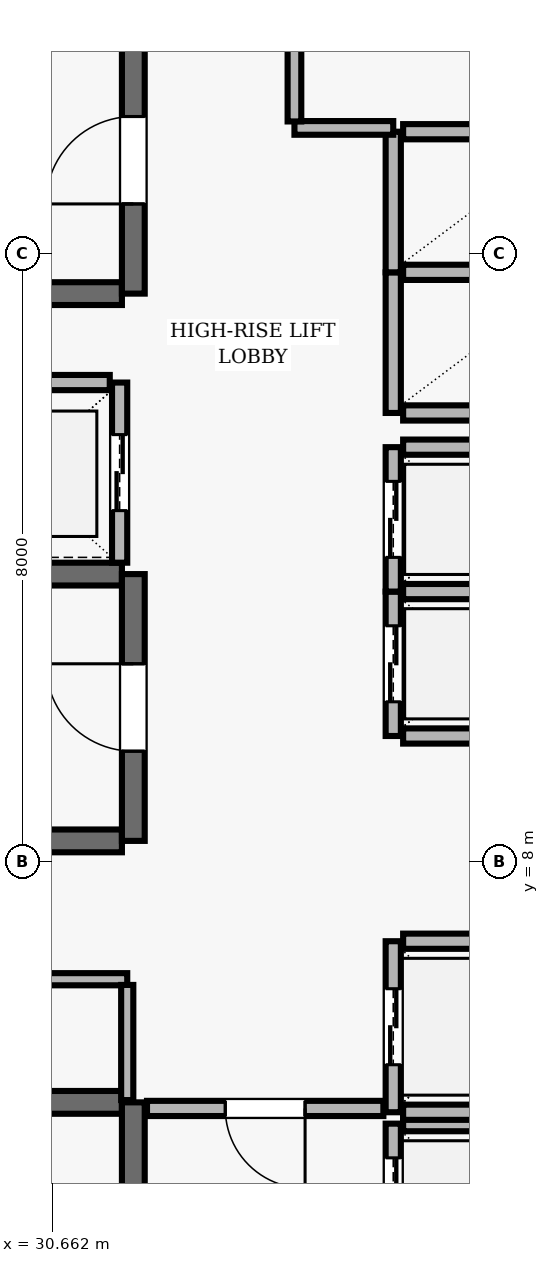
"""IFC4 building model, lengths in metres.
Left out: names, types, materials, properties, quantities, classifications, styles, units other than length and angle.
Written with IfcOpenShell. Run it as: python <this file> out.ifc"""

import sys

from ifc_helpers import new_model, si_unit, direction, frame, frame_2d, origin, place, context, subcontext, project, spatial, rectangle, extrude, element, fill, save


model = new_model("IFC4")
c1 = context("Model", 3, precision=1e-05, world=origin(), true_north=direction((0.0, 1.0)))
c2 = subcontext(c1, "Body", "Model", "MODEL_VIEW")
j1 = project(units=[si_unit("LENGTHUNIT", "METRE"), si_unit("PLANEANGLEUNIT", "RADIAN")], contexts=[c1])
p1 = place(None, origin())
s1 = spatial("IfcSite", under=j1, at=p1, CompositionType="ELEMENT")
p2 = place(p1, origin())
s2 = spatial("IfcBuilding", under=s1, at=p2, CompositionType="ELEMENT")
p3 = place(p2, frame((0.0, 0.0, 191.4)))
s3 = spatial("IfcBuildingStorey", under=s2, at=p3, CompositionType="ELEMENT", Elevation=191.4)
p4 = place(p3, frame((31.58, 4.83, 0.0), z_axis=(0.0, 0.0, 1.0), x_axis=(-1.0, 0.0, 0.0)))
e1 = element("IfcWall", 1, at=p4, inside=s3, PredefinedType="SHEAR", context=c2, shape_type="SweptSolid", body=[
    extrude(rectangle(XDim=8.36, YDim=0.3, at=frame_2d((4.18, 0.0))), origin(), (0.0, 0.0, 1.0), 3.69),
])
p5 = place(p3, frame((31.73, 0.96, 0.0), z_axis=(0.0, 0.0, 1.0), x_axis=(0.0, 1.0, 0.0)))
e2 = element("IfcWall", 2, at=p5, inside=s3, PredefinedType="SHEAR", context=c2, shape_type="SweptSolid", body=[
    extrude(rectangle(XDim=3.87, YDim=0.3, at=frame_2d((1.935, 0.0))), origin(), (0.0, 0.0, 1.0), 3.69),
])
p6 = place(p5, frame((1.54, 0.0, 0.0)))
e3 = element("IfcOpeningElement", 3, at=p6, cuts=e2, PredefinedType="OPENING", context=c2, shape_type="SweptSolid", body=[
    extrude(rectangle(XDim=1.15, YDim=2.15, at=frame_2d((0.575, 1.075))), frame((0.0, 0.16, 0.0), z_axis=(0.0, -1.0, 0.0), x_axis=(1.0, 0.0, 0.0)), (0.0, 0.0, 1.0), 0.32),
])
p7 = place(p3, frame((23.22, 15.47, 0.0), z_axis=(0.0, 0.0, 1.0), x_axis=(1.0, 0.0, 0.0)))
e4 = element("IfcWall", 4, at=p7, inside=s3, PredefinedType="SHEAR", context=c2, shape_type="SweptSolid", body=[
    extrude(rectangle(XDim=8.36, YDim=0.3, at=frame_2d((4.18, 0.0))), origin(), (0.0, 0.0, 1.0), 3.69),
])
p8 = place(p3, frame((31.73, 15.47, 0.0), z_axis=(0.0, 0.0, 1.0), x_axis=(0.0, 1.0, 0.0)))
e5 = element("IfcWall", 5, at=p8, inside=s3, PredefinedType="SHEAR", context=c2, shape_type="SweptSolid", body=[
    extrude(rectangle(XDim=3.51, YDim=0.3, at=frame_2d((1.755, 0.0))), origin(), (0.0, 0.0, 1.0), 3.69),
])
p9 = place(p8, frame((1.18, 0.0, 0.0)))
e6 = element("IfcOpeningElement", 6, at=p9, cuts=e5, PredefinedType="OPENING", context=c2, shape_type="SweptSolid", body=[
    extrude(rectangle(XDim=1.15, YDim=2.15, at=frame_2d((0.575, 1.075))), frame((0.0, 0.16, 0.0), z_axis=(0.0, -1.0, 0.0), x_axis=(1.0, 0.0, 0.0)), (0.0, 0.0, 1.0), 0.32),
])
for number, where, z_axis, x_axis in (
    (7, (31.58, 11.78, 0.0), (0.0, 0.0, 1.0), (-1.0, 0.0, 0.0)),
    (8, (23.22, 8.27, 0.0), (0.0, 0.0, 1.0), (1.0, 0.0, 0.0)),
):
    element("IfcWall", number, at=place(p3, frame(where, z_axis=z_axis, x_axis=x_axis)), inside=s3, PredefinedType="SHEAR", context=c2, shape_type="SweptSolid", body=[
        extrude(rectangle(XDim=8.36, YDim=0.3, at=frame_2d((4.18, 0.0))), origin(), (0.0, 0.0, 1.0), 3.69),
    ])
p10 = place(p3, frame((31.73, 8.27, 0.0), z_axis=(0.0, 0.0, 1.0), x_axis=(0.0, 1.0, 0.0)))
e9 = element("IfcWall", 9, at=p10, inside=s3, PredefinedType="SHEAR", context=c2, shape_type="SweptSolid", body=[
    extrude(rectangle(XDim=3.51, YDim=0.3, at=frame_2d((1.755, 0.0))), origin(), (0.0, 0.0, 1.0), 3.69),
])
p11 = place(p10, frame((1.18, 0.0, 0.0)))
e10 = element("IfcOpeningElement", 10, at=p11, cuts=e9, PredefinedType="OPENING", context=c2, shape_type="SweptSolid", body=[
    extrude(rectangle(XDim=1.15, YDim=2.15, at=frame_2d((0.575, 1.075))), frame((0.0, 0.16, 0.0), z_axis=(0.0, -1.0, 0.0), x_axis=(1.0, 0.0, 0.0)), (0.0, 0.0, 1.0), 0.32),
])
p12 = place(p3, frame((35.15, 4.55, 0.0), z_axis=(0.0, 0.0, 1.0), x_axis=(0.0, -1.0, 0.0)))
e11 = element("IfcWall", 11, at=p12, inside=s3, PredefinedType="SOLIDWALL", context=c2, shape_type="SweptSolid", body=[
    extrude(rectangle(XDim=2.1, YDim=0.2, at=frame_2d((1.05, 0.0))), origin(), (0.0, 0.0, 1.0), 3.69),
])
p13 = place(p12, frame((0.45, 0.0, 0.0)))
e12 = element("IfcOpeningElement", 12, at=p13, cuts=e11, PredefinedType="OPENING", context=c2, shape_type="SweptSolid", body=[
    extrude(rectangle(XDim=1.2, YDim=2.15, at=frame_2d((0.6, 1.075))), frame((0.0, 0.11, 0.0), z_axis=(0.0, -1.0, 0.0), x_axis=(1.0, 0.0, 0.0)), (0.0, 0.0, 1.0), 0.22),
])
p14 = place(p3, frame((37.42, 4.55, 0.0), z_axis=(0.0, 0.0, 1.0), x_axis=(-1.0, 0.0, 0.0)))
e13 = element("IfcWall", 13, at=p14, inside=s3, PredefinedType="SOLIDWALL", context=c2, shape_type="SweptSolid", body=[
    extrude(rectangle(XDim=2.14, YDim=0.2, at=frame_2d((1.07, 0.0))), origin(), (0.0, 0.0, 1.0), 3.69),
])
p15 = place(p3, frame((35.15, 6.95, 0.0), z_axis=(0.0, 0.0, 1.0), x_axis=(0.0, -1.0, 0.0)))
e14 = element("IfcWall", 14, at=p15, inside=s3, PredefinedType="SOLIDWALL", context=c2, shape_type="SweptSolid", body=[
    extrude(rectangle(XDim=2.25, YDim=0.2, at=frame_2d((1.125, 0.0))), origin(), (0.0, 0.0, 1.0), 3.69),
])
p16 = place(p15, frame((0.625, 0.0, 0.0)))
e15 = element("IfcOpeningElement", 15, at=p16, cuts=e14, PredefinedType="OPENING", context=c2, shape_type="SweptSolid", body=[
    extrude(rectangle(XDim=1.0, YDim=2.1, at=frame_2d((0.5, 1.05))), frame((0.0, 0.11, 0.0), z_axis=(0.0, -1.0, 0.0), x_axis=(1.0, 0.0, 0.0)), (0.0, 0.0, 1.0), 0.22),
])
for number, where, z_axis, x_axis in (
    (16, (35.28, 4.7, 0.0), (0.0, 0.0, 1.0), (1.0, 0.0, 0.0)),
    (17, (37.42, 6.95, 0.0), (0.0, 0.0, 1.0), (-1.0, 0.0, 0.0)),
):
    element("IfcWall", number, at=place(p3, frame(where, z_axis=z_axis, x_axis=x_axis)), inside=s3, PredefinedType="SOLIDWALL", context=c2, shape_type="SweptSolid", body=[
        extrude(rectangle(XDim=2.14, YDim=0.2, at=frame_2d((1.07, 0.0))), origin(), (0.0, 0.0, 1.0), 3.69),
    ])
p17 = place(p3, frame((35.15, 11.55, 0.0), z_axis=(0.0, 0.0, 1.0), x_axis=(0.0, -1.0, 0.0)))
e18 = element("IfcWall", 18, at=p17, inside=s3, PredefinedType="SOLIDWALL", context=c2, shape_type="SweptSolid", body=[
    extrude(rectangle(XDim=1.9, YDim=0.2, at=frame_2d((0.95, 0.0))), origin(), (0.0, 0.0, 1.0), 3.69),
])
p18 = place(p17, frame((0.45, 0.0, 0.0)))
e19 = element("IfcOpeningElement", 19, at=p18, cuts=e18, PredefinedType="OPENING", context=c2, shape_type="SweptSolid", body=[
    extrude(rectangle(XDim=1.0, YDim=2.1, at=frame_2d((0.5, 1.05))), frame((0.0, 0.11, 0.0), z_axis=(0.0, -1.0, 0.0), x_axis=(1.0, 0.0, 0.0)), (0.0, 0.0, 1.0), 0.22),
])
for number, where, z_axis, x_axis in (
    (20, (35.28, 9.65, 0.0), (0.0, 0.0, 1.0), (1.0, 0.0, 0.0)),
    (21, (37.42, 11.55, 0.0), (0.0, 0.0, 1.0), (-1.0, 0.0, 0.0)),
):
    element("IfcWall", number, at=place(p3, frame(where, z_axis=z_axis, x_axis=x_axis)), inside=s3, PredefinedType="SOLIDWALL", context=c2, shape_type="SweptSolid", body=[
        extrude(rectangle(XDim=2.14, YDim=0.2, at=frame_2d((1.07, 0.0))), origin(), (0.0, 0.0, 1.0), 3.69),
    ])
p19 = place(p3, frame((35.15, 13.45, 0.0), z_axis=(0.0, 0.0, 1.0), x_axis=(0.0, -1.0, 0.0)))
e22 = element("IfcWall", 22, at=p19, inside=s3, PredefinedType="SOLIDWALL", context=c2, shape_type="SweptSolid", body=[
    extrude(rectangle(XDim=1.9, YDim=0.2, at=frame_2d((0.95, 0.0))), origin(), (0.0, 0.0, 1.0), 3.69),
])
p20 = place(p19, frame((0.45, 0.0, 0.0)))
e23 = element("IfcOpeningElement", 23, at=p20, cuts=e22, PredefinedType="OPENING", context=c2, shape_type="SweptSolid", body=[
    extrude(rectangle(XDim=1.0, YDim=2.1, at=frame_2d((0.5, 1.05))), frame((0.0, 0.11, 0.0), z_axis=(0.0, -1.0, 0.0), x_axis=(1.0, 0.0, 0.0)), (0.0, 0.0, 1.0), 0.22),
])
p21 = place(p3, frame((37.42, 13.45, 0.0), z_axis=(0.0, 0.0, 1.0), x_axis=(-1.0, 0.0, 0.0)))
e24 = element("IfcWall", 24, at=p21, inside=s3, PredefinedType="SOLIDWALL", context=c2, shape_type="SweptSolid", body=[
    extrude(rectangle(XDim=2.14, YDim=0.2, at=frame_2d((1.07, 0.0))), origin(), (0.0, 0.0, 1.0), 3.69),
])
p22 = place(p3, frame((31.55, 11.93, 0.0), z_axis=(0.0, 0.0, 1.0), x_axis=(0.0, 1.0, 0.0)))
e25 = element("IfcWall", 25, at=p22, inside=s3, PredefinedType="SOLIDWALL", context=c2, shape_type="SweptSolid", body=[
    extrude(rectangle(XDim=2.37, YDim=0.2, at=frame_2d((1.185, 0.0))), origin(), (0.0, 0.0, 1.0), 3.69),
])
p23 = place(p22, frame((0.685, 0.0, 0.0)))
e26 = element("IfcOpeningElement", 26, at=p23, cuts=e25, PredefinedType="OPENING", context=c2, shape_type="SweptSolid", body=[
    extrude(rectangle(XDim=1.0, YDim=2.1, at=frame_2d((0.5, 1.05))), frame((0.0, 0.11, 0.0), z_axis=(0.0, -1.0, 0.0), x_axis=(1.0, 0.0, 0.0)), (0.0, 0.0, 1.0), 0.22),
])
p24 = place(p3, frame((31.42, 14.3, 0.0), z_axis=(0.0, 0.0, 1.0), x_axis=(-1.0, 0.0, 0.0)))
e27 = element("IfcWall", 27, at=p24, inside=s3, PredefinedType="SOLIDWALL", context=c2, shape_type="SweptSolid", body=[
    extrude(rectangle(XDim=2.44, YDim=0.2, at=frame_2d((1.22, 0.0))), origin(), (0.0, 0.0, 1.0), 3.69),
])
p25 = place(p3, frame((35.15, 15.75, 0.0), z_axis=(0.0, 0.0, 1.0), x_axis=(0.0, -1.0, 0.0)))
e28 = element("IfcWall", 28, at=p25, inside=s3, PredefinedType="SOLIDWALL", context=c2, shape_type="SweptSolid", body=[
    extrude(rectangle(XDim=1.85, YDim=0.2, at=frame_2d((0.925, 0.0))), origin(), (0.0, 0.0, 1.0), 3.69),
])
for number, where, z_axis, x_axis in (
    (29, (35.28, 13.9, 0.0), (0.0, 0.0, 1.0), (1.0, 0.0, 0.0)),
    (30, (37.42, 15.75, 0.0), (0.0, 0.0, 1.0), (-1.0, 0.0, 0.0)),
):
    element("IfcWall", number, at=place(p3, frame(where, z_axis=z_axis, x_axis=x_axis)), inside=s3, PredefinedType="SOLIDWALL", context=c2, shape_type="SweptSolid", body=[
        extrude(rectangle(XDim=2.14, YDim=0.2, at=frame_2d((1.07, 0.0))), origin(), (0.0, 0.0, 1.0), 3.69),
    ])
p26 = place(p3, frame((35.15, 17.6, 0.0), z_axis=(0.0, 0.0, 1.0), x_axis=(0.0, -1.0, 0.0)))
e31 = element("IfcWall", 31, at=p26, inside=s3, PredefinedType="SOLIDWALL", context=c2, shape_type="SweptSolid", body=[
    extrude(rectangle(XDim=1.85, YDim=0.2, at=frame_2d((0.925, 0.0))), origin(), (0.0, 0.0, 1.0), 3.69),
])
p27 = place(p3, frame((37.42, 17.6, 0.0), z_axis=(0.0, 0.0, 1.0), x_axis=(-1.0, 0.0, 0.0)))
e32 = element("IfcWall", 32, at=p27, inside=s3, PredefinedType="SOLIDWALL", context=c2, shape_type="SweptSolid", body=[
    extrude(rectangle(XDim=2.14, YDim=0.2, at=frame_2d((1.07, 0.0))), origin(), (0.0, 0.0, 1.0), 3.69),
])
p28 = place(p3, frame((28.55, 6.45, 0.0), z_axis=(0.0, 0.0, 1.0), x_axis=(1.0, 0.0, 0.0)))
e33 = element("IfcWall", 33, at=p28, inside=s3, PredefinedType="PARTITIONING", context=c2, shape_type="SweptSolid", body=[
    extrude(rectangle(XDim=3.1, YDim=0.16, at=frame_2d((1.55, 0.0))), origin(), (0.0, 0.0, 1.0), 3.69),
])
p29 = place(p28, frame((1.11, 0.0, 0.0)))
e34 = element("IfcOpeningElement", 34, at=p29, cuts=e33, PredefinedType="OPENING", context=c2, shape_type="SweptSolid", body=[
    extrude(rectangle(XDim=0.88, YDim=2.1, at=frame_2d((0.44, 1.05))), frame((0.0, 0.09, 0.0), z_axis=(0.0, -1.0, 0.0), x_axis=(1.0, 0.0, 0.0)), (0.0, 0.0, 1.0), 0.18),
])
p30 = place(p3, frame((33.85, 17.65, 0.0), z_axis=(0.0, 0.0, 1.0), x_axis=(1.0, 0.0, 0.0)))
e35 = element("IfcWall", 35, at=p30, inside=s3, PredefinedType="PARTITIONING", context=c2, shape_type="SweptSolid", body=[
    extrude(rectangle(XDim=1.3, YDim=0.18, at=frame_2d((0.65, 0.0))), origin(), (0.0, 0.0, 1.0), 3.69),
])
p31 = place(p3, frame((35.02, 4.75, 0.0), z_axis=(0.0, 0.0, 1.0), x_axis=(-1.0, 0.0, 0.0)))
e36 = element("IfcWall", 36, at=p31, inside=s3, PredefinedType="SOLIDWALL", context=c2, shape_type="SweptSolid", body=[
    extrude(rectangle(XDim=3.11, YDim=0.2, at=frame_2d((1.555, 0.0))), origin(), (0.0, 0.0, 1.0), 3.69),
])
p32 = place(p31, frame((1.03, 0.0, 0.0)))
e37 = element("IfcOpeningElement", 37, at=p32, cuts=e36, PredefinedType="OPENING", context=c2, shape_type="SweptSolid", body=[
    extrude(rectangle(XDim=1.05, YDim=2.15, at=frame_2d((0.525, 1.075))), frame((0.0, 0.11, 0.0), z_axis=(0.0, -1.0, 0.0), x_axis=(1.0, 0.0, 0.0)), (0.0, 0.0, 1.0), 0.22),
])
p33 = place(p3, frame((31.65, 4.86, 0.0), z_axis=(0.0, 0.0, 1.0), x_axis=(0.0, 1.0, 0.0)))
e38 = element("IfcWall", 38, at=p33, inside=s3, PredefinedType="PARTITIONING", context=c2, shape_type="SweptSolid", body=[
    extrude(rectangle(XDim=1.515, YDim=0.16, at=frame_2d((0.757, 0.0))), origin(), (0.0, 0.0, 1.0), 3.69),
])
p34 = place(p3, frame((33.85, 17.735, 0.0), z_axis=(0.0, 0.0, 1.0), x_axis=(0.0, 1.0, 0.0)))
e39 = element("IfcWall", 39, at=p34, inside=s3, PredefinedType="PARTITIONING", context=c2, shape_type="SweptSolid", body=[
    extrude(rectangle(XDim=6.03, YDim=0.18, at=frame_2d((3.015, 0.0))), origin(), (0.0, 0.0, 1.0), 3.69),
])
p35 = place(p34, frame((2.54, 0.0, 0.0)))
e40 = element("IfcOpeningElement", 40, at=p35, cuts=e39, PredefinedType="OPENING", context=c2, shape_type="SweptSolid", body=[
    extrude(rectangle(XDim=0.95, YDim=2.1, at=frame_2d((0.475, 1.05))), frame((0.0, 0.1, 0.0), z_axis=(0.0, -1.0, 0.0), x_axis=(1.0, 0.0, 0.0)), (0.0, 0.0, 1.0), 0.2),
])
p36 = place(p9, origin())
e41 = element("IfcDoor", 41, at=p36, inside=s3, OperationType="SINGLE_SWING_LEFT", PredefinedType="DOOR", context=c2, shape_type="SweptSolid", body=[
    extrude(rectangle(XDim=1.15, YDim=2.15, at=frame_2d((0.575, 1.075))), frame((0.0, 0.025, 0.0), z_axis=(0.0, -1.0, 0.0), x_axis=(1.0, 0.0, 0.0)), (0.0, 0.0, 1.0), 0.05),
])
fill(e6, e41)
p37 = place(p11, origin())
e42 = element("IfcDoor", 42, at=p37, inside=s3, OperationType="SINGLE_SWING_RIGHT", PredefinedType="DOOR", context=c2, shape_type="SweptSolid", body=[
    extrude(rectangle(XDim=1.15, YDim=2.15, at=frame_2d((0.575, 1.075))), frame((0.0, 0.025, 0.0), z_axis=(0.0, -1.0, 0.0), x_axis=(1.0, 0.0, 0.0)), (0.0, 0.0, 1.0), 0.05),
])
fill(e10, e42)
p38 = place(p13, origin())
e43 = element("IfcDoor", 43, at=p38, inside=s3, OperationType="DOUBLE_DOOR_SLIDING", PredefinedType="DOOR", context=c2, shape_type="SweptSolid", body=[
    extrude(rectangle(XDim=1.2, YDim=2.15, at=frame_2d((0.6, 1.075))), frame((0.0, 0.025, 0.0), z_axis=(0.0, -1.0, 0.0), x_axis=(1.0, 0.0, 0.0)), (0.0, 0.0, 1.0), 0.05),
])
fill(e12, e43)
p39 = place(p16, origin())
e44 = element("IfcDoor", 44, at=p39, inside=s3, OperationType="DOUBLE_DOOR_SLIDING", PredefinedType="DOOR", context=c2, shape_type="SweptSolid", body=[
    extrude(rectangle(XDim=1.0, YDim=2.1, at=frame_2d((0.5, 1.05))), frame((0.0, 0.025, 0.0), z_axis=(0.0, -1.0, 0.0), x_axis=(1.0, 0.0, 0.0)), (0.0, 0.0, 1.0), 0.05),
])
fill(e15, e44)
p40 = place(p18, origin())
e45 = element("IfcDoor", 45, at=p40, inside=s3, OperationType="DOUBLE_DOOR_SLIDING", PredefinedType="DOOR", context=c2, shape_type="SweptSolid", body=[
    extrude(rectangle(XDim=1.0, YDim=2.1, at=frame_2d((0.5, 1.05))), frame((0.0, 0.025, 0.0), z_axis=(0.0, -1.0, 0.0), x_axis=(1.0, 0.0, 0.0)), (0.0, 0.0, 1.0), 0.05),
])
fill(e19, e45)
p41 = place(p20, origin())
e46 = element("IfcDoor", 46, at=p41, inside=s3, OperationType="DOUBLE_DOOR_SLIDING", PredefinedType="DOOR", context=c2, shape_type="SweptSolid", body=[
    extrude(rectangle(XDim=1.0, YDim=2.1, at=frame_2d((0.5, 1.05))), frame((0.0, 0.025, 0.0), z_axis=(0.0, -1.0, 0.0), x_axis=(1.0, 0.0, 0.0)), (0.0, 0.0, 1.0), 0.05),
])
fill(e23, e46)
p42 = place(p23, origin())
e47 = element("IfcDoor", 47, at=p42, inside=s3, OperationType="DOUBLE_DOOR_SLIDING", PredefinedType="DOOR", context=c2, shape_type="SweptSolid", body=[
    extrude(rectangle(XDim=1.0, YDim=2.1, at=frame_2d((0.5, 1.05))), frame((0.0, 0.025, 0.0), z_axis=(0.0, -1.0, 0.0), x_axis=(1.0, 0.0, 0.0)), (0.0, 0.0, 1.0), 0.05),
])
fill(e26, e47)
p43 = place(p32, origin())
e48 = element("IfcDoor", 48, at=p43, inside=s3, OperationType="SINGLE_SWING_LEFT", PredefinedType="DOOR", context=c2, shape_type="SweptSolid", body=[
    extrude(rectangle(XDim=1.05, YDim=2.15, at=frame_2d((0.525, 1.075))), frame((0.0, 0.025, 0.0), z_axis=(0.0, -1.0, 0.0), x_axis=(1.0, 0.0, 0.0)), (0.0, 0.0, 1.0), 0.05),
])
fill(e37, e48)
save(model, sys.argv[1])
